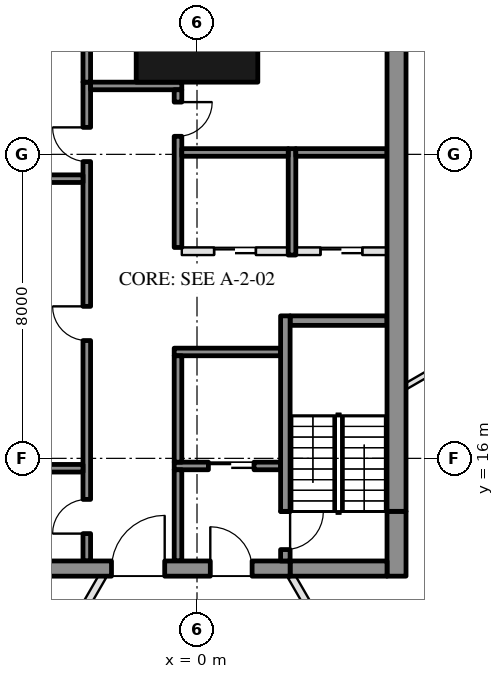
"""IFC4 building model, lengths in metres.
Left out: names, types, materials, properties, quantities, classifications, styles, units other than length and angle.
Written with IfcOpenShell. Run it as: python <this file> out.ifc"""

import sys

from ifc_helpers import new_model, si_unit, direction, frame, frame_2d, origin, origin_2d, place, context, subcontext, project, spatial, rectangle, hollow_rectangle, extrude, element, fill, save


model = new_model("IFC4")
c1 = context("Model", 3, precision=1e-05, world=origin(), true_north=direction((0.0, 1.0)))
c2 = subcontext(c1, "Body", "Model", "MODEL_VIEW")
j1 = project(units=[si_unit("LENGTHUNIT", "METRE"), si_unit("PLANEANGLEUNIT", "RADIAN")], contexts=[c1])
p1 = place(None, origin())
s1 = spatial("IfcSite", under=j1, at=p1, CompositionType="ELEMENT")
p2 = place(p1, origin())
s2 = spatial("IfcBuilding", under=s1, at=p2, CompositionType="ELEMENT")
p3 = place(p2, frame((0.0, 0.0, 9.0)))
s3 = spatial("IfcBuildingStorey", under=s2, at=p3, CompositionType="ELEMENT", Elevation=9.0)
p4 = place(p3, frame((0.0, 27.2, 0.0), z_axis=(0.0, 0.0, 1.0), x_axis=(1.0, 0.0, 0.0)))
e1 = element("IfcColumn", 1, at=p4, inside=s3, PredefinedType="COLUMN", context=c2, shape_type="SweptSolid", body=[
    extrude(hollow_rectangle(XDim=3.2, YDim=2.6, WallThickness=0.08, at=origin_2d()), origin(), (0.0, 0.0, 1.0), 6.5),
])
p5 = place(p3, frame((5.0, 19.625, 0.0), z_axis=(0.0, 0.0, 1.0), x_axis=(-1.0, 0.0, 0.0)))
e2 = element("IfcWall", 2, at=p5, inside=s3, PredefinedType="SHEAR", context=c2, shape_type="SweptSolid", body=[
    extrude(rectangle(XDim=2.55, YDim=0.25, at=frame_2d((1.275, 0.0))), origin(), (0.0, 0.0, 1.0), 6.15),
])
p6 = place(p3, frame((2.2, 18.8, 0.0), z_axis=(0.0, 0.0, 1.0), x_axis=(-1.0, 0.0, 0.0)))
e3 = element("IfcWall", 3, at=p6, inside=s3, PredefinedType="SHEAR", context=c2, shape_type="SweptSolid", body=[
    extrude(rectangle(XDim=2.8, YDim=0.2, at=frame_2d((1.4, 0.0))), origin(), (0.0, 0.0, 1.0), 6.15),
])
p7 = place(p3, frame((2.2, 15.8, 0.0), z_axis=(0.0, 0.0, 1.0), x_axis=(-1.0, 0.0, 0.0)))
e4 = element("IfcWall", 4, at=p7, inside=s3, PredefinedType="SHEAR", context=c2, shape_type="SweptSolid", body=[
    extrude(rectangle(XDim=2.8, YDim=0.2, at=frame_2d((1.4, 0.0))), origin(), (0.0, 0.0, 1.0), 6.15),
])
p8 = place(p7, frame((0.7, 0.0, 0.0)))
e5 = element("IfcOpeningElement", 5, at=p8, cuts=e4, PredefinedType="OPENING", context=c2, shape_type="SweptSolid", body=[
    extrude(rectangle(XDim=1.2, YDim=2.1, at=frame_2d((0.6, 1.05))), frame((0.0, 0.11, 0.0), z_axis=(0.0, -1.0, 0.0), x_axis=(1.0, 0.0, 0.0)), (0.0, 0.0, 1.0), 0.22),
])
p9 = place(p3, frame((-0.5, 15.9, 0.0), z_axis=(0.0, 0.0, 1.0), x_axis=(0.0, 1.0, 0.0)))
e6 = element("IfcWall", 6, at=p9, inside=s3, PredefinedType="SHEAR", context=c2, shape_type="SweptSolid", body=[
    extrude(rectangle(XDim=2.8, YDim=0.2, at=frame_2d((1.4, 0.0))), origin(), (0.0, 0.0, 1.0), 6.15),
])
p10 = place(p3, frame((-0.5, 13.3, 0.0), z_axis=(0.0, 0.0, 1.0), x_axis=(0.0, 1.0, 0.0)))
e7 = element("IfcWall", 7, at=p10, inside=s3, PredefinedType="SHEAR", context=c2, shape_type="SweptSolid", body=[
    extrude(rectangle(XDim=2.4, YDim=0.2, at=frame_2d((1.2, 0.0))), origin(), (0.0, 0.0, 1.0), 6.15),
])
p11 = place(p3, frame((-2.9, 13.3, 0.0), z_axis=(0.0, 0.0, 1.0), x_axis=(0.0, 1.0, 0.0)))
e8 = element("IfcWall", 8, at=p11, inside=s3, PredefinedType="SHEAR", context=c2, shape_type="SweptSolid", body=[
    extrude(rectangle(XDim=12.6, YDim=0.2, at=frame_2d((6.3, 0.0))), origin(), (0.0, 0.0, 1.0), 6.15),
])
p12 = place(p11, frame((0.72, 0.0, 0.0)))
e9 = element("IfcOpeningElement", 9, at=p12, cuts=e8, PredefinedType="OPENING", context=c2, shape_type="SweptSolid", body=[
    extrude(rectangle(XDim=0.9, YDim=2.1, at=frame_2d((0.45, 1.05))), frame((0.0, 0.11, 0.0), z_axis=(0.0, -1.0, 0.0), x_axis=(1.0, 0.0, 0.0)), (0.0, 0.0, 1.0), 0.22),
])
p13 = place(p11, frame((5.8, 0.0, 0.0)))
e10 = element("IfcOpeningElement", 10, at=p13, cuts=e8, PredefinedType="OPENING", context=c2, shape_type="SweptSolid", body=[
    extrude(rectangle(XDim=0.9, YDim=2.1, at=frame_2d((0.45, 1.05))), frame((0.0, 0.11, 0.0), z_axis=(0.0, -1.0, 0.0), x_axis=(1.0, 0.0, 0.0)), (0.0, 0.0, 1.0), 0.22),
])
p14 = place(p11, frame((10.51, 0.0, 0.0)))
e11 = element("IfcOpeningElement", 11, at=p14, cuts=e8, PredefinedType="OPENING", context=c2, shape_type="SweptSolid", body=[
    extrude(rectangle(XDim=0.9, YDim=2.1, at=frame_2d((0.45, 1.05))), frame((0.0, 0.11, 0.0), z_axis=(0.0, -1.0, 0.0), x_axis=(1.0, 0.0, 0.0)), (0.0, 0.0, 1.0), 0.22),
])
p15 = place(p3, frame((-0.4, 25.8, 0.0), z_axis=(0.0, 0.0, 1.0), x_axis=(-1.0, 0.0, 0.0)))
e12 = element("IfcWall", 12, at=p15, inside=s3, PredefinedType="SHEAR", context=c2, shape_type="SweptSolid", body=[
    extrude(rectangle(XDim=2.4, YDim=0.2, at=frame_2d((1.2, 0.0))), origin(), (0.0, 0.0, 1.0), 6.15),
])
p16 = place(p3, frame((-0.5, 21.55, 0.0), z_axis=(0.0, 0.0, 1.0), x_axis=(0.0, 1.0, 0.0)))
e13 = element("IfcWall", 13, at=p16, inside=s3, PredefinedType="SHEAR", context=c2, shape_type="SweptSolid", body=[
    extrude(rectangle(XDim=4.15, YDim=0.2, at=frame_2d((2.075, 0.0))), origin(), (0.0, 0.0, 1.0), 6.15),
])
p17 = place(p16, frame((2.925, 0.0, 0.0)))
e14 = element("IfcOpeningElement", 14, at=p17, cuts=e13, PredefinedType="OPENING", context=c2, shape_type="SweptSolid", body=[
    extrude(rectangle(XDim=0.9, YDim=2.1, at=frame_2d((0.45, 1.05))), frame((0.0, 0.11, 0.0), z_axis=(0.0, -1.0, 0.0), x_axis=(1.0, 0.0, 0.0)), (0.0, 0.0, 1.0), 0.22),
])
for number, where, z_axis, x_axis in (
    (15, (-3.0, 15.74, 0.0), (0.0, 0.0, 1.0), (-1.0, 0.0, 0.0)),
    (16, (-3.0, 23.36, 0.0), (0.0, 0.0, 1.0), (-1.0, 0.0, 0.0)),
):
    element("IfcWall", number, at=place(p3, frame(where, z_axis=z_axis, x_axis=x_axis)), inside=s3, PredefinedType="SHEAR", context=c2, shape_type="SweptSolid", body=[
        extrude(rectangle(XDim=2.0, YDim=0.2, at=frame_2d((1.0, 0.0))), origin(), (0.0, 0.0, 1.0), 6.15),
    ])
p18 = place(p3, frame((-2.9, 25.9, 0.0), z_axis=(0.0, 0.0, 1.0), x_axis=(0.0, 1.0, 0.0)))
e17 = element("IfcWall", 17, at=p18, inside=s3, PredefinedType="SHEAR", context=c2, shape_type="SweptSolid", body=[
    extrude(rectangle(XDim=2.2, YDim=0.2, at=frame_2d((1.1, 0.0))), origin(), (0.0, 0.0, 1.0), 6.15),
])
p19 = place(p3, frame((2.5, 21.35, 0.0), z_axis=(0.0, 0.0, 1.0), x_axis=(0.0, 1.0, 0.0)))
e18 = element("IfcWall", 18, at=p19, inside=s3, PredefinedType="SHEAR", context=c2, shape_type="SweptSolid", body=[
    extrude(rectangle(XDim=2.8, YDim=0.2, at=frame_2d((1.4, 0.0))), origin(), (0.0, 0.0, 1.0), 6.15),
])
p20 = place(p3, frame((5.0, 24.05, 0.0), z_axis=(0.0, 0.0, 1.0), x_axis=(-1.0, 0.0, 0.0)))
e19 = element("IfcWall", 19, at=p20, inside=s3, PredefinedType="SHEAR", context=c2, shape_type="SweptSolid", body=[
    extrude(rectangle(XDim=2.4, YDim=0.2, at=frame_2d((1.2, 0.0))), origin(), (0.0, 0.0, 1.0), 6.15),
])
p21 = place(p3, frame((2.4, 24.05, 0.0), z_axis=(0.0, 0.0, 1.0), x_axis=(-1.0, 0.0, 0.0)))
e20 = element("IfcWall", 20, at=p21, inside=s3, PredefinedType="SHEAR", context=c2, shape_type="SweptSolid", body=[
    extrude(rectangle(XDim=2.8, YDim=0.2, at=frame_2d((1.4, 0.0))), origin(), (0.0, 0.0, 1.0), 6.15),
])
p22 = place(p3, frame((5.0, 21.45, 0.0), z_axis=(0.0, 0.0, 1.0), x_axis=(-1.0, 0.0, 0.0)))
e21 = element("IfcWall", 21, at=p22, inside=s3, PredefinedType="PARTITIONING", context=c2, shape_type="SweptSolid", body=[
    extrude(rectangle(XDim=2.4, YDim=0.2, at=frame_2d((1.2, 0.0))), origin(), (0.0, 0.0, 1.0), 6.15),
])
p23 = place(p22, frame((0.65, 0.0, 0.0)))
e22 = element("IfcOpeningElement", 22, at=p23, cuts=e21, PredefinedType="OPENING", context=c2, shape_type="SweptSolid", body=[
    extrude(rectangle(XDim=1.1, YDim=2.1, at=frame_2d((0.55, 1.05))), frame((0.0, 0.11, 0.0), z_axis=(0.0, -1.0, 0.0), x_axis=(1.0, 0.0, 0.0)), (0.0, 0.0, 1.0), 0.22),
])
p24 = place(p3, frame((2.4, 21.45, 0.0), z_axis=(0.0, 0.0, 1.0), x_axis=(-1.0, 0.0, 0.0)))
e23 = element("IfcWall", 23, at=p24, inside=s3, PredefinedType="PARTITIONING", context=c2, shape_type="SweptSolid", body=[
    extrude(rectangle(XDim=2.8, YDim=0.2, at=frame_2d((1.4, 0.0))), origin(), (0.0, 0.0, 1.0), 6.15),
])
p25 = place(p24, frame((0.85, 0.0, 0.0)))
e24 = element("IfcOpeningElement", 24, at=p25, cuts=e23, PredefinedType="OPENING", context=c2, shape_type="SweptSolid", body=[
    extrude(rectangle(XDim=1.1, YDim=2.1, at=frame_2d((0.55, 1.05))), frame((0.0, 0.11, 0.0), z_axis=(0.0, -1.0, 0.0), x_axis=(1.0, 0.0, 0.0)), (0.0, 0.0, 1.0), 0.22),
])
p26 = place(p3, frame((5.25, 12.9, 0.0), z_axis=(0.0, 0.0, 1.0), x_axis=(0.0, 1.0, 0.0)))
e25 = element("IfcWall", 25, at=p26, inside=s3, PredefinedType="SHEAR", context=c2, shape_type="SweptSolid", body=[
    extrude(rectangle(XDim=1.706, YDim=0.5, at=frame_2d((0.853, 0.0))), origin(), (0.0, 0.0, 1.0), 6.15),
])
p27 = place(p3, frame((5.25, 14.606, 0.0), z_axis=(0.0, 0.0, 1.0), x_axis=(0.0, 1.0, 0.0)))
e26 = element("IfcWall", 26, at=p27, inside=s3, PredefinedType="SHEAR", context=c2, shape_type="SweptSolid", body=[
    extrude(rectangle(XDim=13.894, YDim=0.5, at=frame_2d((6.947, 0.0))), origin(), (0.0, 0.0, 1.0), 6.15),
])
p28 = place(p3, frame((5.0, 13.1, 0.0), z_axis=(0.0, 0.0, 1.0), x_axis=(-1.0, 0.0, 0.0)))
e27 = element("IfcWall", 27, at=p28, inside=s3, PredefinedType="SHEAR", context=c2, shape_type="SweptSolid", body=[
    extrude(rectangle(XDim=2.55, YDim=0.4, at=frame_2d((1.275, 0.0))), origin(), (0.0, 0.0, 1.0), 6.15),
])
p29 = place(p3, frame((2.45, 13.1, 0.0), z_axis=(0.0, 0.0, 1.0), x_axis=(-1.0, 0.0, 0.0)))
e28 = element("IfcWall", 28, at=p29, inside=s3, PredefinedType="SHEAR", context=c2, shape_type="SweptSolid", body=[
    extrude(rectangle(XDim=7.45, YDim=0.4, at=frame_2d((3.725, 0.0))), origin(), (0.0, 0.0, 1.0), 6.15),
])
p30 = place(p29, frame((1.0, 0.0, 0.0)))
e29 = element("IfcOpeningElement", 29, at=p30, cuts=e28, PredefinedType="OPENING", context=c2, shape_type="SweptSolid", body=[
    extrude(rectangle(XDim=1.1, YDim=2.1, at=frame_2d((0.55, 1.05))), frame((0.0, 0.21, 0.0), z_axis=(0.0, -1.0, 0.0), x_axis=(1.0, 0.0, 0.0)), (0.0, 0.0, 1.0), 0.42),
])
p31 = place(p29, frame((3.3, 0.0, 0.0)))
e30 = element("IfcOpeningElement", 30, at=p31, cuts=e28, PredefinedType="OPENING", context=c2, shape_type="SweptSolid", body=[
    extrude(rectangle(XDim=1.4, YDim=2.1, at=frame_2d((0.7, 1.05))), frame((0.0, 0.21, 0.0), z_axis=(0.0, -1.0, 0.0), x_axis=(1.0, 0.0, 0.0)), (0.0, 0.0, 1.0), 0.42),
])
p32 = place(p3, frame((2.325, 13.3, 0.0), z_axis=(0.0, 0.0, 1.0), x_axis=(0.0, 1.0, 0.0)))
e31 = element("IfcWall", 31, at=p32, inside=s3, PredefinedType="SHEAR", context=c2, shape_type="SweptSolid", body=[
    extrude(rectangle(XDim=1.306, YDim=0.25, at=frame_2d((0.653, 0.0))), origin(), (0.0, 0.0, 1.0), 6.15),
])
p33 = place(p32, frame((0.3, 0.0, 0.0)))
e32 = element("IfcOpeningElement", 32, at=p33, cuts=e31, PredefinedType="OPENING", context=c2, shape_type="SweptSolid", body=[
    extrude(rectangle(XDim=1.0, YDim=2.1, at=frame_2d((0.5, 1.05))), frame((0.0, 0.135, 0.0), z_axis=(0.0, -1.0, 0.0), x_axis=(1.0, 0.0, 0.0)), (0.0, 0.0, 1.0), 0.27),
])
p34 = place(p3, frame((2.325, 14.606, 0.0), z_axis=(0.0, 0.0, 1.0), x_axis=(0.0, 1.0, 0.0)))
e33 = element("IfcWall", 33, at=p34, inside=s3, PredefinedType="SHEAR", context=c2, shape_type="SweptSolid", body=[
    extrude(rectangle(XDim=5.144, YDim=0.25, at=frame_2d((2.572, 0.0))), origin(), (0.0, 0.0, 1.0), 6.15),
])
p35 = place(p3, frame((15.228, 16.182, 0.0), z_axis=(0.0, 0.0, 1.0), x_axis=(-0.866027204995, -0.499996880198, 0.0)))
e34 = element("IfcWall", 34, at=p35, inside=s3, PredefinedType="SOLIDWALL", context=c2, shape_type="SweptSolid", body=[
    extrude(rectangle(XDim=12.578, YDim=0.2, at=frame_2d((6.289, 0.0))), origin(), (0.0, 0.0, 1.0), 6.15),
])
p36 = place(p3, frame((12.052, 21.681, 0.0), z_axis=(0.0, 0.0, 1.0), x_axis=(-0.866018471794, -0.500012006368, 0.0)))
e35 = element("IfcWall", 35, at=p36, inside=s3, PredefinedType="PARTITIONING", context=c2, shape_type="SweptSolid", body=[
    extrude(rectangle(XDim=7.566, YDim=0.15, at=frame_2d((3.783, 0.0))), origin(), (0.0, 0.0, 1.0), 5.55),
])
p37 = place(p36, frame((3.333, 0.0, 0.0)))
e36 = element("IfcOpeningElement", 36, at=p37, cuts=e35, PredefinedType="OPENING", context=c2, shape_type="SweptSolid", body=[
    extrude(rectangle(XDim=0.9, YDim=2.1, at=frame_2d((0.45, 1.05))), frame((0.0, 0.085, 0.0), z_axis=(0.0, -1.0, 0.0), x_axis=(1.0, 0.0, 0.0)), (0.0, 0.0, 1.0), 0.17),
])
p38 = place(p3, frame((12.413, -4.3, 0.0), z_axis=(0.0, 0.0, 1.0), x_axis=(-0.50000478328, 0.866022642139, 0.0)))
e37 = element("IfcWall", 37, at=p38, inside=s3, PredefinedType="PARTITIONING", context=c2, shape_type="SweptSolid", body=[
    extrude(rectangle(XDim=19.861, YDim=0.2, at=frame_2d((9.931, 0.0))), origin(), (0.0, 0.0, 1.0), 5.36),
])
p39 = place(p38, frame((1.342, 0.0, 0.0)))
e38 = element("IfcOpeningElement", 38, at=p39, cuts=e37, PredefinedType="OPENING", context=c2, shape_type="SweptSolid", body=[
    extrude(rectangle(XDim=1.8, YDim=2.4, at=frame_2d((0.9, 1.2))), frame((0.0, 0.11, 0.0), z_axis=(0.0, -1.0, 0.0), x_axis=(1.0, 0.0, 0.0)), (0.0, 0.0, 1.0), 0.22),
])
p40 = place(p38, frame((5.825, 0.0, 0.0)))
e39 = element("IfcOpeningElement", 39, at=p40, cuts=e37, PredefinedType="OPENING", context=c2, shape_type="SweptSolid", body=[
    extrude(rectangle(XDim=1.8, YDim=2.4, at=frame_2d((0.9, 1.2))), frame((0.0, 0.11, 0.0), z_axis=(0.0, -1.0, 0.0), x_axis=(1.0, 0.0, 0.0)), (0.0, 0.0, 1.0), 0.22),
])
p41 = place(p38, frame((9.818, 0.0, 0.0)))
e40 = element("IfcOpeningElement", 40, at=p41, cuts=e37, PredefinedType="OPENING", context=c2, shape_type="SweptSolid", body=[
    extrude(rectangle(XDim=1.2, YDim=2.1, at=frame_2d((0.6, 1.05))), frame((0.0, 0.11, 0.0), z_axis=(0.0, -1.0, 0.0), x_axis=(1.0, 0.0, 0.0)), (0.0, 0.0, 1.0), 0.22),
])
p42 = place(p38, frame((17.49, 0.0, 0.0)))
e41 = element("IfcOpeningElement", 41, at=p42, cuts=e37, PredefinedType="OPENING", context=c2, shape_type="SweptSolid", body=[
    extrude(rectangle(XDim=1.2, YDim=2.1, at=frame_2d((0.6, 1.05))), frame((0.0, 0.11, 0.0), z_axis=(0.0, -1.0, 0.0), x_axis=(1.0, 0.0, 0.0)), (0.0, 0.0, 1.0), 0.22),
])
p43 = place(p38, frame((13.23, 0.0, 0.0)))
e42 = element("IfcOpeningElement", 42, at=p43, cuts=e37, PredefinedType="OPENING", context=c2, shape_type="SweptSolid", body=[
    extrude(rectangle(XDim=1.8, YDim=2.1, at=frame_2d((0.9, 1.05))), frame((0.0, 0.11, 0.0), z_axis=(0.0, -1.0, 0.0), x_axis=(1.0, 0.0, 0.0)), (0.0, 0.0, 1.0), 0.22),
])
p44 = place(p3, frame((-2.482, 12.9, 0.0), z_axis=(0.0, 0.0, 1.0), x_axis=(-0.50000478328, -0.866022642139, 0.0)))
e43 = element("IfcWall", 43, at=p44, inside=s3, PredefinedType="PARTITIONING", context=c2, shape_type="SweptSolid", body=[
    extrude(rectangle(XDim=19.861, YDim=0.2, at=frame_2d((9.931, 0.0))), origin(), (0.0, 0.0, 1.0), 5.36),
])
p45 = place(p44, frame((13.23, 0.0, 0.0)))
e44 = element("IfcOpeningElement", 44, at=p45, cuts=e43, PredefinedType="OPENING", context=c2, shape_type="SweptSolid", body=[
    extrude(rectangle(XDim=1.8, YDim=2.1, at=frame_2d((0.9, 1.05))), frame((0.0, 0.11, 0.0), z_axis=(0.0, -1.0, 0.0), x_axis=(1.0, 0.0, 0.0)), (0.0, 0.0, 1.0), 0.22),
])
p46 = place(p44, frame((0.984, 0.0, 0.0)))
e45 = element("IfcOpeningElement", 45, at=p46, cuts=e43, PredefinedType="OPENING", context=c2, shape_type="SweptSolid", body=[
    extrude(rectangle(XDim=1.5, YDim=2.1, at=frame_2d((0.75, 1.05))), frame((0.0, 0.11, 0.0), z_axis=(0.0, -1.0, 0.0), x_axis=(1.0, 0.0, 0.0)), (0.0, 0.0, 1.0), 0.22),
])
p47 = place(p44, frame((16.89, 0.0, 0.0)))
e46 = element("IfcOpeningElement", 46, at=p47, cuts=e43, PredefinedType="OPENING", context=c2, shape_type="SweptSolid", body=[
    extrude(rectangle(XDim=1.8, YDim=2.4, at=frame_2d((0.9, 1.2))), frame((0.0, 0.11, 0.0), z_axis=(0.0, -1.0, 0.0), x_axis=(1.0, 0.0, 0.0)), (0.0, 0.0, 1.0), 0.22),
])
p48 = place(p44, frame((7.168, 0.0, 0.0)))
e47 = element("IfcOpeningElement", 47, at=p48, cuts=e43, PredefinedType="OPENING", context=c2, shape_type="SweptSolid", body=[
    extrude(rectangle(XDim=1.0, YDim=2.1, at=frame_2d((0.5, 1.05))), frame((0.0, 0.11, 0.0), z_axis=(0.0, -1.0, 0.0), x_axis=(1.0, 0.0, 0.0)), (0.0, 0.0, 1.0), 0.22),
])
p49 = place(p8, origin())
e48 = element("IfcDoor", 48, at=p49, inside=s3, OperationType="DOUBLE_DOOR_SLIDING", PredefinedType="DOOR", context=c2, shape_type="SweptSolid", body=[
    extrude(rectangle(XDim=1.2, YDim=2.1, at=frame_2d((0.6, 1.05))), frame((0.0, 0.025, 0.0), z_axis=(0.0, -1.0, 0.0), x_axis=(1.0, 0.0, 0.0)), (0.0, 0.0, 1.0), 0.05),
])
fill(e5, e48)
p50 = place(p12, origin())
e49 = element("IfcDoor", 49, at=p50, inside=s3, OperationType="SINGLE_SWING_LEFT", PredefinedType="DOOR", context=c2, shape_type="SweptSolid", body=[
    extrude(rectangle(XDim=0.9, YDim=2.1, at=frame_2d((0.45, 1.05))), frame((0.0, 0.025, 0.0), z_axis=(0.0, -1.0, 0.0), x_axis=(1.0, 0.0, 0.0)), (0.0, 0.0, 1.0), 0.05),
])
fill(e9, e49)
p51 = place(p13, origin())
e50 = element("IfcDoor", 50, at=p51, inside=s3, OperationType="SINGLE_SWING_RIGHT", PredefinedType="DOOR", context=c2, shape_type="SweptSolid", body=[
    extrude(rectangle(XDim=0.9, YDim=2.1, at=frame_2d((0.45, 1.05))), frame((0.0, 0.025, 0.0), z_axis=(0.0, -1.0, 0.0), x_axis=(1.0, 0.0, 0.0)), (0.0, 0.0, 1.0), 0.05),
])
fill(e10, e50)
p52 = place(p14, origin())
e51 = element("IfcDoor", 51, at=p52, inside=s3, OperationType="SINGLE_SWING_RIGHT", PredefinedType="DOOR", context=c2, shape_type="SweptSolid", body=[
    extrude(rectangle(XDim=0.9, YDim=2.1, at=frame_2d((0.45, 1.05))), frame((0.0, 0.025, 0.0), z_axis=(0.0, -1.0, 0.0), x_axis=(1.0, 0.0, 0.0)), (0.0, 0.0, 1.0), 0.05),
])
fill(e11, e51)
p53 = place(p23, origin())
e52 = element("IfcDoor", 52, at=p53, inside=s3, OperationType="DOUBLE_DOOR_SLIDING", PredefinedType="DOOR", context=c2, shape_type="SweptSolid", body=[
    extrude(rectangle(XDim=1.1, YDim=2.1, at=frame_2d((0.55, 1.05))), frame((0.0, 0.025, 0.0), z_axis=(0.0, -1.0, 0.0), x_axis=(1.0, 0.0, 0.0)), (0.0, 0.0, 1.0), 0.05),
])
fill(e22, e52)
p54 = place(p25, origin())
e53 = element("IfcDoor", 53, at=p54, inside=s3, OperationType="DOUBLE_DOOR_SLIDING", PredefinedType="DOOR", context=c2, shape_type="SweptSolid", body=[
    extrude(rectangle(XDim=1.1, YDim=2.1, at=frame_2d((0.55, 1.05))), frame((0.0, 0.025, 0.0), z_axis=(0.0, -1.0, 0.0), x_axis=(1.0, 0.0, 0.0)), (0.0, 0.0, 1.0), 0.05),
])
fill(e24, e53)
p55 = place(p17, frame((0.9, 0.0, 0.0), z_axis=(0.0, 0.0, 1.0), x_axis=(-1.0, 0.0, 0.0)))
e54 = element("IfcDoor", 54, at=p55, inside=s3, OperationType="SINGLE_SWING_LEFT", PredefinedType="DOOR", context=c2, shape_type="SweptSolid", body=[
    extrude(rectangle(XDim=0.9, YDim=2.1, at=frame_2d((0.45, 1.05))), frame((0.0, 0.025, 0.0), z_axis=(0.0, -1.0, 0.0), x_axis=(1.0, 0.0, 0.0)), (0.0, 0.0, 1.0), 0.05),
])
fill(e14, e54)
p56 = place(p30, frame((1.1, 0.0, 0.0), z_axis=(0.0, 0.0, 1.0), x_axis=(-1.0, 0.0, 0.0)))
e55 = element("IfcDoor", 55, at=p56, inside=s3, OperationType="SINGLE_SWING_LEFT", PredefinedType="DOOR", context=c2, shape_type="SweptSolid", body=[
    extrude(rectangle(XDim=1.1, YDim=2.1, at=frame_2d((0.55, 1.05))), frame((0.0, 0.025, 0.0), z_axis=(0.0, -1.0, 0.0), x_axis=(1.0, 0.0, 0.0)), (0.0, 0.0, 1.0), 0.05),
])
fill(e29, e55)
p57 = place(p31, frame((1.4, 0.0, 0.0), z_axis=(0.0, 0.0, 1.0), x_axis=(-1.0, 0.0, 0.0)))
e56 = element("IfcDoor", 56, at=p57, inside=s3, OperationType="DOUBLE_DOOR_SINGLE_SWING", PredefinedType="DOOR", context=c2, shape_type="SweptSolid", body=[
    extrude(rectangle(XDim=1.4, YDim=2.1, at=frame_2d((0.7, 1.05))), frame((0.0, 0.025, 0.0), z_axis=(0.0, -1.0, 0.0), x_axis=(1.0, 0.0, 0.0)), (0.0, 0.0, 1.0), 0.05),
])
fill(e30, e56)
p58 = place(p33, frame((1.0, 0.0, 0.0), z_axis=(0.0, 0.0, 1.0), x_axis=(-1.0, 0.0, 0.0)))
e57 = element("IfcDoor", 57, at=p58, inside=s3, OperationType="SINGLE_SWING_LEFT", PredefinedType="DOOR", context=c2, shape_type="SweptSolid", body=[
    extrude(rectangle(XDim=1.0, YDim=2.1, at=frame_2d((0.5, 1.05))), frame((0.0, 0.025, 0.0), z_axis=(0.0, -1.0, 0.0), x_axis=(1.0, 0.0, 0.0)), (0.0, 0.0, 1.0), 0.05),
])
fill(e32, e57)
save(model, sys.argv[1])
